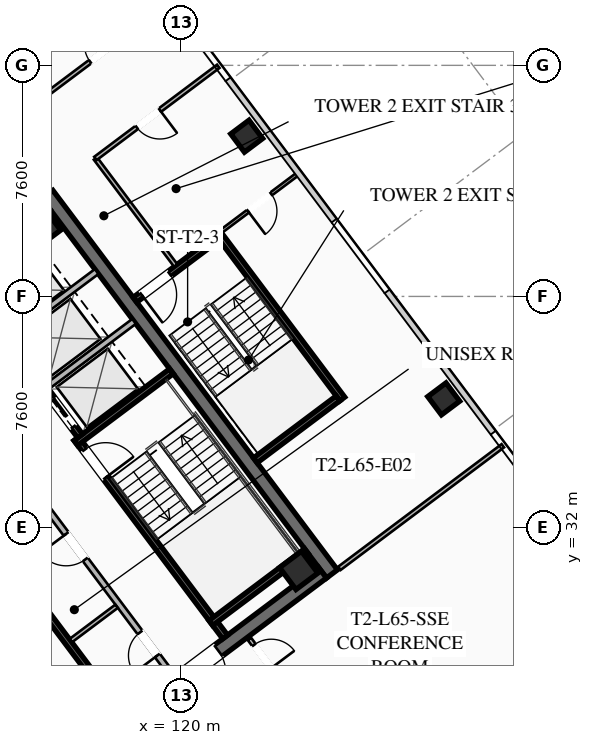
"""IFC4 building model, lengths in metres.
Left out: names, types, materials, properties, quantities, classifications, styles, units other than length and angle.
Written with IfcOpenShell. Run it as: python <this file> out.ifc"""

import sys

from ifc_helpers import new_model, si_unit, direction, frame, frame_2d, origin, origin_2d, place, context, subcontext, project, spatial, rectangle, hollow_rectangle, extrude, element, fill, save


model = new_model("IFC4")
c1 = context("Model", 3, precision=1e-05, world=origin(), true_north=direction((0.0, 1.0)))
c2 = subcontext(c1, "Body", "Model", "MODEL_VIEW")
j1 = project(units=[si_unit("LENGTHUNIT", "METRE"), si_unit("PLANEANGLEUNIT", "RADIAN")], contexts=[c1])
p1 = place(None, origin())
s1 = spatial("IfcSite", under=j1, at=p1, CompositionType="ELEMENT")
p2 = place(p1, origin())
s2 = spatial("IfcBuilding", under=s1, at=p2, CompositionType="ELEMENT")
p3 = place(p2, frame((0.0, 0.0, 239.7)))
s3 = spatial("IfcBuildingStorey", under=s2, at=p3, CompositionType="ELEMENT", Elevation=239.7)
p4 = place(p3, frame((115.604, 42.953, 0.0), z_axis=(0.0, 0.0, 1.0), x_axis=(0.600005007985, -0.799996243986, 0.0)))
e1 = element("IfcWall", 1, at=p4, inside=s3, PredefinedType="SHEAR", context=c2, shape_type="SweptSolid", body=[
    extrude(rectangle(XDim=15.6, YDim=0.45, at=frame_2d((7.8, 0.0))), origin(), (0.0, 0.0, 1.0), 3.55),
])
p5 = place(p3, frame((124.649, 30.518, 0.0), z_axis=(0.0, 0.0, 1.0), x_axis=(-0.8, -0.6, 0.0)))
e2 = element("IfcWall", 2, at=p5, inside=s3, PredefinedType="SHEAR", context=c2, shape_type="SweptSolid", body=[
    extrude(rectangle(XDim=15.26, YDim=0.45, at=frame_2d((7.63, 0.0))), origin(), (0.0, 0.0, 1.0), 3.55),
])
p6 = place(p5, frame((9.33, 0.0, 0.0)))
e3 = element("IfcOpeningElement", 3, at=p6, cuts=e2, PredefinedType="OPENING", context=c2, shape_type="SweptSolid", body=[
    extrude(rectangle(XDim=1.25, YDim=2.25, at=frame_2d((0.625, 1.125))), frame((0.0, 0.235, 0.0), z_axis=(0.0, -1.0, 0.0), x_axis=(1.0, 0.0, 0.0)), (0.0, 0.0, 1.0), 0.47),
])
p7 = place(p5, frame((4.28, 0.0, 0.0)))
e4 = element("IfcOpeningElement", 4, at=p7, cuts=e2, PredefinedType="OPENING", context=c2, shape_type="SweptSolid", body=[
    extrude(rectangle(XDim=1.25, YDim=2.25, at=frame_2d((0.625, 1.125))), frame((0.0, 0.235, 0.0), z_axis=(0.0, -1.0, 0.0), x_axis=(1.0, 0.0, 0.0)), (0.0, 0.0, 1.0), 0.47),
])
for number, where, z_axis, x_axis in (
    (5, (123.87, 30.59, 0.0), (0.0, 0.0, 1.0), (0.8, 0.6, 0.0)),
    (6, (115.41, 41.87, 0.0), (0.0, 0.0, 1.0), (0.8, 0.6, 0.0)),
):
    element("IfcColumn", number, at=place(p3, frame(where, z_axis=z_axis, x_axis=x_axis)), inside=s3, PredefinedType="COLUMN", context=c2, shape_type="SweptSolid", body=[
        extrude(hollow_rectangle(XDim=0.9, YDim=0.9, WallThickness=0.04, at=origin_2d()), origin(), (0.0, 0.0, 1.0), 3.37),
    ])
for number, where, z_axis, x_axis in (
    (7, (128.64, 36.23, 0.0), (0.0, 0.0, 1.0), (0.8, 0.6, 0.0)),
    (8, (122.16, 44.87, 0.0), (0.0, 0.0, 1.0), (0.8, 0.6, 0.0)),
):
    element("IfcColumn", number, at=place(p3, frame(where, z_axis=z_axis, x_axis=x_axis)), inside=s3, PredefinedType="COLUMN", context=c2, shape_type="SweptSolid", body=[
        extrude(hollow_rectangle(XDim=0.75, YDim=0.75, WallThickness=0.032, at=origin_2d()), origin(), (0.0, 0.0, 1.0), 3.37),
    ])
p8 = place(p3, frame((116.56, 34.92, 0.0), z_axis=(0.0, 0.0, 1.0), x_axis=(0.59999041401, -0.800007189403, 0.0)))
e9 = element("IfcWall", 9, at=p8, inside=s3, PredefinedType="SHEAR", context=c2, shape_type="SweptSolid", body=[
    extrude(rectangle(XDim=8.15, YDim=0.2, at=frame_2d((4.075, 0.0))), origin(), (0.0, 0.0, 1.0), 3.37),
])
p9 = place(p8, frame((0.45, 0.0, 0.0)))
e10 = element("IfcOpeningElement", 10, at=p9, cuts=e9, PredefinedType="OPENING", context=c2, shape_type="SweptSolid", body=[
    extrude(rectangle(XDim=1.15, YDim=2.2, at=frame_2d((0.575, 1.1))), frame((0.0, 0.11, 0.0), z_axis=(0.0, -1.0, 0.0), x_axis=(1.0, 0.0, 0.0)), (0.0, 0.0, 1.0), 0.22),
])
for number, where, z_axis, x_axis in (
    (11, (116.54, 34.78, 0.0), (0.0, 0.0, 1.0), (0.8, 0.6, 0.0)),
    (12, (120.98, 28.86, 0.0), (0.0, 0.0, 1.0), (0.8, 0.6, 0.0)),
):
    element("IfcWall", number, at=place(p3, frame(where, z_axis=z_axis, x_axis=x_axis)), inside=s3, PredefinedType="SHEAR", context=c2, shape_type="SweptSolid", body=[
        extrude(rectangle(XDim=3.93, YDim=0.2, at=frame_2d((1.965, 0.0))), origin(), (0.0, 0.0, 1.0), 3.37),
    ])
p10 = place(p3, frame((118.058, 25.856, 0.0), z_axis=(0.0, 0.0, 1.0), x_axis=(-0.600002657301, 0.799998007018, 0.0)))
e13 = element("IfcWall", 13, at=p10, inside=s3, PredefinedType="SHEAR", context=c2, shape_type="SweptSolid", body=[
    extrude(rectangle(XDim=14.7, YDim=0.2, at=frame_2d((7.35, 0.0))), origin(), (0.0, 0.0, 1.0), 3.37),
])
p11 = place(p3, frame((112.75, 40.25, 0.0), z_axis=(0.0, 0.0, 1.0), x_axis=(0.599994036198, -0.800004472816, 0.0)))
e14 = element("IfcWall", 14, at=p11, inside=s3, PredefinedType="SHEAR", context=c2, shape_type="SweptSolid", body=[
    extrude(rectangle(XDim=6.55, YDim=0.2, at=frame_2d((3.275, 0.0))), origin(), (0.0, 0.0, 1.0), 3.37),
])
p12 = place(p11, frame((5.075, 0.0, 0.0)))
e15 = element("IfcOpeningElement", 15, at=p12, cuts=e14, PredefinedType="OPENING", context=c2, shape_type="SweptSolid", body=[
    extrude(rectangle(XDim=1.1, YDim=2.2, at=frame_2d((0.55, 1.1))), frame((0.0, 0.11, 0.0), z_axis=(0.0, -1.0, 0.0), x_axis=(1.0, 0.0, 0.0)), (0.0, 0.0, 1.0), 0.22),
])
p13 = place(p11, frame((3.025, 0.0, 0.0)))
e16 = element("IfcOpeningElement", 16, at=p13, cuts=e14, PredefinedType="OPENING", context=c2, shape_type="SweptSolid", body=[
    extrude(rectangle(XDim=1.1, YDim=2.2, at=frame_2d((0.55, 1.1))), frame((0.0, 0.11, 0.0), z_axis=(0.0, -1.0, 0.0), x_axis=(1.0, 0.0, 0.0)), (0.0, 0.0, 1.0), 0.22),
])
p14 = place(p11, frame((1.025, 0.0, 0.0)))
e17 = element("IfcOpeningElement", 17, at=p14, cuts=e14, PredefinedType="OPENING", context=c2, shape_type="SweptSolid", body=[
    extrude(rectangle(XDim=1.1, YDim=2.2, at=frame_2d((0.55, 1.1))), frame((0.0, 0.11, 0.0), z_axis=(0.0, -1.0, 0.0), x_axis=(1.0, 0.0, 0.0)), (0.0, 0.0, 1.0), 0.22),
])
for number, where, z_axis, x_axis in (
    (18, (115.59, 36.63, 0.0), (0.0, 0.0, 1.0), (0.8, 0.6, 0.0)),
    (19, (114.36, 38.27, 0.0), (0.0, 0.0, 1.0), (0.8, 0.6, 0.0)),
):
    element("IfcWall", number, at=place(p3, frame(where, z_axis=z_axis, x_axis=x_axis)), inside=s3, PredefinedType="SOLIDWALL", context=c2, shape_type="SweptSolid", body=[
        extrude(rectangle(XDim=3.58, YDim=0.2, at=frame_2d((1.79, 0.0))), origin(), (0.0, 0.0, 1.0), 3.37),
    ])
p15 = place(p3, frame((119.73, 27.11, 0.0), z_axis=(0.0, 0.0, 1.0), x_axis=(-0.600005580459, 0.799995814625, 0.0)))
e20 = element("IfcWall", 20, at=p15, inside=s3, PredefinedType="SOLIDWALL", context=c2, shape_type="SweptSolid", body=[
    extrude(rectangle(XDim=7.0, YDim=0.2, at=frame_2d((3.5, 0.0))), origin(), (0.0, 0.0, 1.0), 2.723),
])
p16 = place(p15, frame((0.85, 0.0, 0.0)))
e21 = element("IfcOpeningElement", 21, at=p16, cuts=e20, PredefinedType="OPENING", context=c2, shape_type="SweptSolid", body=[
    extrude(rectangle(XDim=0.95, YDim=2.05, at=frame_2d((0.475, 1.025))), frame((0.0, 0.11, 0.0), z_axis=(0.0, -1.0, 0.0), x_axis=(1.0, 0.0, 0.0)), (0.0, 0.0, 1.0), 0.22),
])
p17 = place(p15, frame((4.8, 0.0, 0.0)))
e22 = element("IfcOpeningElement", 22, at=p17, cuts=e20, PredefinedType="OPENING", context=c2, shape_type="SweptSolid", body=[
    extrude(rectangle(XDim=1.05, YDim=2.2, at=frame_2d((0.525, 1.1))), frame((0.0, 0.11, 0.0), z_axis=(0.0, -1.0, 0.0), x_axis=(1.0, 0.0, 0.0)), (0.0, 0.0, 1.0), 0.22),
])
p18 = place(p3, frame((116.376, 28.282, 0.0), z_axis=(0.0, 0.0, 1.0), x_axis=(0.8, 0.6, 0.0)))
e23 = element("IfcWall", 23, at=p18, inside=s3, PredefinedType="PARTITIONING", context=c2, shape_type="SweptSolid", body=[
    extrude(rectangle(XDim=1.88, YDim=0.135, at=frame_2d((0.94, 0.0))), origin(), (0.0, 0.0, 1.0), 2.723),
])
p19 = place(p3, frame((125.304, 36.228, 0.0), z_axis=(0.0, 0.0, 1.0), x_axis=(-0.59998851072, 0.800008616831, 0.0)))
e24 = element("IfcWall", 24, at=p19, inside=s3, PredefinedType="SHEAR", context=c2, shape_type="SweptSolid", body=[
    extrude(rectangle(XDim=6.8, YDim=0.2, at=frame_2d((3.4, 0.0))), origin(), (0.0, 0.0, 1.0), 3.37),
])
p20 = place(p3, frame((121.204, 41.528, 0.0), z_axis=(0.0, 0.0, 1.0), x_axis=(-0.800017232136, -0.599977023131, 0.0)))
e25 = element("IfcWall", 25, at=p20, inside=s3, PredefinedType="SHEAR", context=c2, shape_type="SweptSolid", body=[
    extrude(rectangle(XDim=3.4, YDim=0.2, at=frame_2d((1.7, 0.0))), origin(), (0.0, 0.0, 1.0), 3.37),
])
p21 = place(p20, frame((1.975, 0.0, 0.0)))
e26 = element("IfcOpeningElement", 26, at=p21, cuts=e25, PredefinedType="OPENING", context=c2, shape_type="SweptSolid", body=[
    extrude(rectangle(XDim=1.15, YDim=2.2, at=frame_2d((0.575, 1.1))), frame((0.0, 0.11, 0.0), z_axis=(0.0, -1.0, 0.0), x_axis=(1.0, 0.0, 0.0)), (0.0, 0.0, 1.0), 0.22),
])
p22 = place(p3, frame((122.444, 34.208, 0.0), z_axis=(0.0, 0.0, 1.0), x_axis=(0.79999138319, 0.600011488909, 0.0)))
e27 = element("IfcWall", 27, at=p22, inside=s3, PredefinedType="SHEAR", context=c2, shape_type="SweptSolid", body=[
    extrude(rectangle(XDim=3.4, YDim=0.2, at=frame_2d((1.7, 0.0))), origin(), (0.0, 0.0, 1.0), 3.37),
])
p23 = place(p3, frame((119.824, 40.618, 0.0), z_axis=(0.0, 0.0, 1.0), x_axis=(-0.599982243973, 0.800013316712, 0.0)))
e28 = element("IfcWall", 28, at=p23, inside=s3, PredefinedType="PARTITIONING", context=c2, shape_type="SweptSolid", body=[
    extrude(rectangle(XDim=4.4, YDim=0.135, at=frame_2d((2.2, 0.0))), origin(), (0.0, 0.0, 1.0), 2.723),
])
p24 = place(p3, frame((98.93, 33.76, 0.0), z_axis=(0.0, 0.0, 1.0), x_axis=(0.8, 0.6, 0.0)))
e29 = element("IfcWall", 29, at=p24, inside=s3, PredefinedType="PARTITIONING", context=c2, shape_type="SweptSolid", body=[
    extrude(rectangle(XDim=23.85, YDim=0.135, at=frame_2d((11.925, 0.0))), origin(), (0.0, 0.0, 1.0), 2.723),
])
p25 = place(p24, frame((0.3, 0.0, 0.0)))
e30 = element("IfcOpeningElement", 30, at=p25, cuts=e29, PredefinedType="OPENING", context=c2, shape_type="SweptSolid", body=[
    extrude(rectangle(XDim=0.95, YDim=2.05, at=frame_2d((0.475, 1.025))), frame((0.0, 0.077, 0.0), z_axis=(0.0, -1.0, 0.0), x_axis=(1.0, 0.0, 0.0)), (0.0, 0.0, 1.0), 0.155),
])
p26 = place(p24, frame((10.779, 0.0, 0.0)))
e31 = element("IfcOpeningElement", 31, at=p26, cuts=e29, PredefinedType="OPENING", context=c2, shape_type="SweptSolid", body=[
    extrude(rectangle(XDim=0.95, YDim=2.05, at=frame_2d((0.475, 1.025))), frame((0.0, 0.077, 0.0), z_axis=(0.0, -1.0, 0.0), x_axis=(1.0, 0.0, 0.0)), (0.0, 0.0, 1.0), 0.155),
])
p27 = place(p24, frame((14.585, 0.0, 0.0)))
e32 = element("IfcOpeningElement", 32, at=p27, cuts=e29, PredefinedType="OPENING", context=c2, shape_type="SweptSolid", body=[
    extrude(rectangle(XDim=0.95, YDim=2.05, at=frame_2d((0.475, 1.025))), frame((0.0, 0.077, 0.0), z_axis=(0.0, -1.0, 0.0), x_axis=(1.0, 0.0, 0.0)), (0.0, 0.0, 1.0), 0.155),
])
p28 = place(p24, frame((22.6, 0.0, 0.0)))
e33 = element("IfcOpeningElement", 33, at=p28, cuts=e29, PredefinedType="OPENING", context=c2, shape_type="SweptSolid", body=[
    extrude(rectangle(XDim=0.95, YDim=2.05, at=frame_2d((0.475, 1.025))), frame((0.0, 0.077, 0.0), z_axis=(0.0, -1.0, 0.0), x_axis=(1.0, 0.0, 0.0)), (0.0, 0.0, 1.0), 0.155),
])
p29 = place(p3, frame((122.248, 28.336, 0.0), z_axis=(0.0, 0.0, 1.0), x_axis=(0.600012849883, -0.799990362426, 0.0)))
e34 = element("IfcWall", 34, at=p29, inside=s3, PredefinedType="PARTITIONING", context=c2, shape_type="SweptSolid", body=[
    extrude(rectangle(XDim=3.04, YDim=0.135, at=frame_2d((1.52, 0.0))), origin(), (0.0, 0.0, 1.0), 2.723),
])
p30 = place(p29, frame((0.25, 0.0, 0.0)))
e35 = element("IfcOpeningElement", 35, at=p30, cuts=e34, PredefinedType="OPENING", context=c2, shape_type="SweptSolid", body=[
    extrude(rectangle(XDim=0.95, YDim=2.05, at=frame_2d((0.475, 1.025))), frame((0.0, 0.077, 0.0), z_axis=(0.0, -1.0, 0.0), x_axis=(1.0, 0.0, 0.0)), (0.0, 0.0, 1.0), 0.155),
])
p31 = place(p3, frame((121.224, 47.168, 0.0), z_axis=(0.0, 0.0, 1.0), x_axis=(-0.8, -0.6, 0.0)))
e36 = element("IfcWall", 36, at=p31, inside=s3, PredefinedType="PARTITIONING", context=c2, shape_type="SweptSolid", body=[
    extrude(rectangle(XDim=5.05, YDim=0.135, at=frame_2d((2.525, 0.0))), origin(), (0.0, 0.0, 1.0), 2.723),
])
p32 = place(p31, frame((2.4, 0.0, 0.0)))
e37 = element("IfcOpeningElement", 37, at=p32, cuts=e36, PredefinedType="OPENING", context=c2, shape_type="SweptSolid", body=[
    extrude(rectangle(XDim=0.95, YDim=2.05, at=frame_2d((0.475, 1.025))), frame((0.0, 0.077, 0.0), z_axis=(0.0, -1.0, 0.0), x_axis=(1.0, 0.0, 0.0)), (0.0, 0.0, 1.0), 0.155),
])
p33 = place(p3, frame((125.208, 30.656, 0.0), z_axis=(0.0, 0.0, 1.0), x_axis=(0.8, 0.6, 0.0)))
e38 = element("IfcWall", 38, at=p33, inside=s3, PredefinedType="PARTITIONING", context=c2, shape_type="SweptSolid", body=[
    extrude(rectangle(XDim=6.72, YDim=0.135, at=frame_2d((3.36, 0.0))), origin(), (0.0, 0.0, 1.0), 2.723),
])
p34 = place(p3, frame((123.864, 43.648, 0.0), z_axis=(0.0, 0.0, 1.0), x_axis=(-0.800018310174, -0.599975585658, 0.0)))
e39 = element("IfcWall", 39, at=p34, inside=s3, PredefinedType="PARTITIONING", context=c2, shape_type="SweptSolid", body=[
    extrude(rectangle(XDim=3.2, YDim=0.11, at=frame_2d((1.6, 0.0))), origin(), (0.0, 0.0, 1.0), 2.723),
])
p35 = place(p34, frame((1.125, 0.0, 0.0)))
e40 = element("IfcOpeningElement", 40, at=p35, cuts=e39, PredefinedType="OPENING", context=c2, shape_type="SweptSolid", body=[
    extrude(rectangle(XDim=0.95, YDim=2.05, at=frame_2d((0.475, 1.025))), frame((0.0, 0.065, 0.0), z_axis=(0.0, -1.0, 0.0), x_axis=(1.0, 0.0, 0.0)), (0.0, 0.0, 1.0), 0.13),
])
p36 = place(p7, origin())
e41 = element("IfcDoor", 41, at=p36, inside=s3, OperationType="SINGLE_SWING_RIGHT", PredefinedType="DOOR", context=c2, shape_type="SweptSolid", body=[
    extrude(rectangle(XDim=1.25, YDim=2.25, at=frame_2d((0.625, 1.125))), frame((0.0, 0.025, 0.0), z_axis=(0.0, -1.0, 0.0), x_axis=(1.0, 0.0, 0.0)), (0.0, 0.0, 1.0), 0.05),
])
fill(e4, e41)
p37 = place(p9, origin())
e42 = element("IfcDoor", 42, at=p37, inside=s3, OperationType="SINGLE_SWING_RIGHT", PredefinedType="DOOR", context=c2, shape_type="SweptSolid", body=[
    extrude(rectangle(XDim=1.15, YDim=2.2, at=frame_2d((0.575, 1.1))), frame((0.0, 0.025, 0.0), z_axis=(0.0, -1.0, 0.0), x_axis=(1.0, 0.0, 0.0)), (0.0, 0.0, 1.0), 0.05),
])
fill(e10, e42)
p38 = place(p16, origin())
e43 = element("IfcDoor", 43, at=p38, inside=s3, OperationType="SINGLE_SWING_LEFT", PredefinedType="DOOR", context=c2, shape_type="SweptSolid", body=[
    extrude(rectangle(XDim=0.95, YDim=2.05, at=frame_2d((0.475, 1.025))), frame((0.0, 0.025, 0.0), z_axis=(0.0, -1.0, 0.0), x_axis=(1.0, 0.0, 0.0)), (0.0, 0.0, 1.0), 0.05),
])
fill(e21, e43)
p39 = place(p17, origin())
e44 = element("IfcDoor", 44, at=p39, inside=s3, OperationType="SINGLE_SWING_RIGHT", PredefinedType="DOOR", context=c2, shape_type="SweptSolid", body=[
    extrude(rectangle(XDim=1.05, YDim=2.2, at=frame_2d((0.525, 1.1))), frame((0.0, 0.025, 0.0), z_axis=(0.0, -1.0, 0.0), x_axis=(1.0, 0.0, 0.0)), (0.0, 0.0, 1.0), 0.05),
])
fill(e22, e44)
p40 = place(p21, origin())
e45 = element("IfcDoor", 45, at=p40, inside=s3, OperationType="SINGLE_SWING_RIGHT", PredefinedType="DOOR", context=c2, shape_type="SweptSolid", body=[
    extrude(rectangle(XDim=1.15, YDim=2.2, at=frame_2d((0.575, 1.1))), frame((0.0, 0.025, 0.0), z_axis=(0.0, -1.0, 0.0), x_axis=(1.0, 0.0, 0.0)), (0.0, 0.0, 1.0), 0.05),
])
fill(e26, e45)
p41 = place(p28, origin())
e46 = element("IfcDoor", 46, at=p41, inside=s3, OperationType="SINGLE_SWING_RIGHT", PredefinedType="DOOR", context=c2, shape_type="SweptSolid", body=[
    extrude(rectangle(XDim=0.95, YDim=2.05, at=frame_2d((0.475, 1.025))), frame((0.0, 0.025, 0.0), z_axis=(0.0, -1.0, 0.0), x_axis=(1.0, 0.0, 0.0)), (0.0, 0.0, 1.0), 0.05),
])
fill(e33, e46)
p42 = place(p30, origin())
e47 = element("IfcDoor", 47, at=p42, inside=s3, OperationType="SINGLE_SWING_RIGHT", PredefinedType="DOOR", context=c2, shape_type="SweptSolid", body=[
    extrude(rectangle(XDim=0.95, YDim=2.05, at=frame_2d((0.475, 1.025))), frame((0.0, 0.025, 0.0), z_axis=(0.0, -1.0, 0.0), x_axis=(1.0, 0.0, 0.0)), (0.0, 0.0, 1.0), 0.05),
])
fill(e35, e47)
p43 = place(p32, origin())
e48 = element("IfcDoor", 48, at=p43, inside=s3, OperationType="SINGLE_SWING_LEFT", PredefinedType="DOOR", context=c2, shape_type="SweptSolid", body=[
    extrude(rectangle(XDim=0.95, YDim=2.05, at=frame_2d((0.475, 1.025))), frame((0.0, 0.025, 0.0), z_axis=(0.0, -1.0, 0.0), x_axis=(1.0, 0.0, 0.0)), (0.0, 0.0, 1.0), 0.05),
])
fill(e37, e48)
p44 = place(p35, origin())
e49 = element("IfcDoor", 49, at=p44, inside=s3, OperationType="SINGLE_SWING_RIGHT", PredefinedType="DOOR", context=c2, shape_type="SweptSolid", body=[
    extrude(rectangle(XDim=0.95, YDim=2.05, at=frame_2d((0.475, 1.025))), frame((0.0, 0.025, 0.0), z_axis=(0.0, -1.0, 0.0), x_axis=(1.0, 0.0, 0.0)), (0.0, 0.0, 1.0), 0.05),
])
fill(e40, e49)
p45 = place(p12, origin())
e50 = element("IfcDoor", 50, at=p45, inside=s3, OperationType="SLIDING_TO_LEFT", PredefinedType="DOOR", context=c2, shape_type="SweptSolid", body=[
    extrude(rectangle(XDim=1.1, YDim=2.2, at=frame_2d((0.55, 1.1))), frame((0.0, 0.025, 0.0), z_axis=(0.0, -1.0, 0.0), x_axis=(1.0, 0.0, 0.0)), (0.0, 0.0, 1.0), 0.05),
])
fill(e15, e50)
save(model, sys.argv[1])
